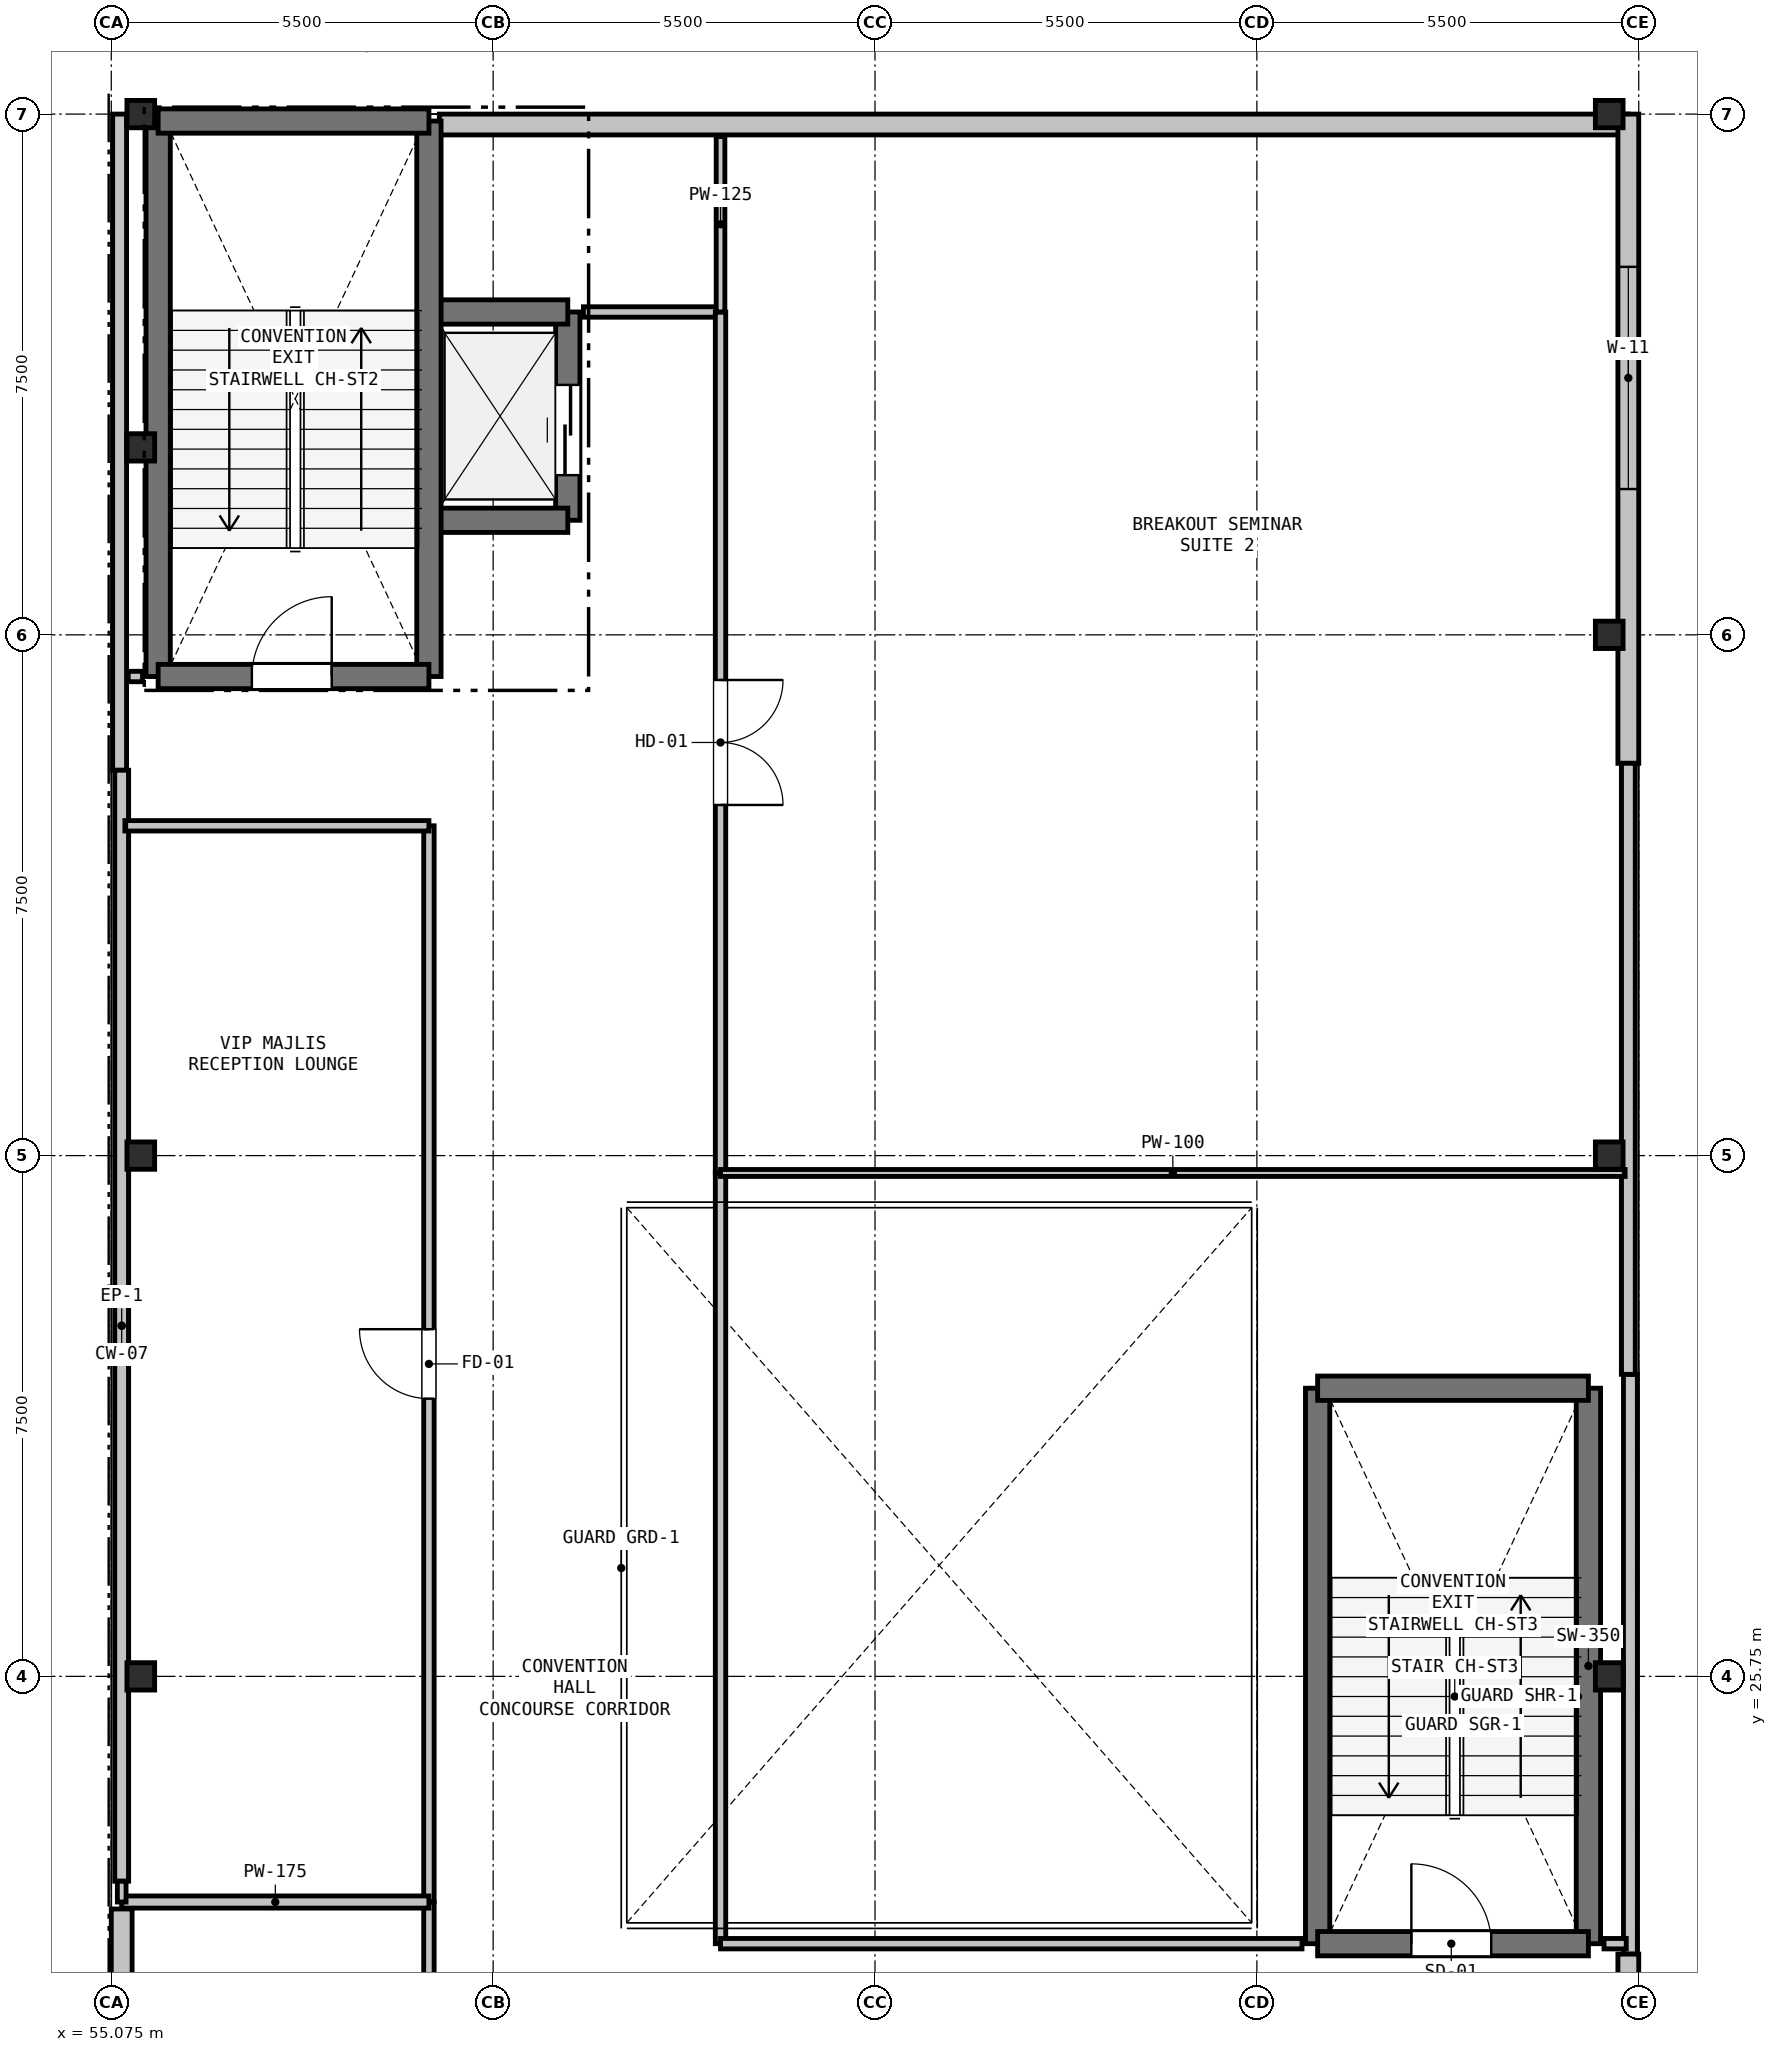
"""IFC4 building model, lengths in metres.
Left out: names, types, materials, properties, quantities, classifications, styles, units other than length and angle.
Written with IfcOpenShell. Run it as: python <this file> out.ifc"""

import sys

from ifc_helpers import new_model, si_unit, direction, frame, frame_2d, origin, origin_2d, place, context, subcontext, project, spatial, rectangle, i_section, extrude, element, fill, save


model = new_model("IFC4")
c1 = context("Model", 3, precision=1e-05, world=origin(), true_north=direction((0.0, 1.0)))
c2 = subcontext(c1, "Body", "Model", "MODEL_VIEW")
j1 = project(units=[si_unit("LENGTHUNIT", "METRE"), si_unit("PLANEANGLEUNIT", "RADIAN")], contexts=[c1])
p1 = place(None, origin())
s1 = spatial("IfcSite", under=j1, at=p1, CompositionType="ELEMENT")
p2 = place(p1, origin())
s2 = spatial("IfcBuilding", under=s1, at=p2, CompositionType="ELEMENT")
p3 = place(p2, frame((0.0, 0.0, 5.1)))
s3 = spatial("IfcBuildingStorey", under=s2, at=p3, CompositionType="ELEMENT", Elevation=5.1)
for number, where, z_axis, x_axis in (
    (1, (55.5, 25.75, 0.0), (0.0, 0.0, 1.0), (1.0, 0.0, 0.0)),
    (2, (55.5, 33.25, 0.0), (0.0, 0.0, 1.0), (1.0, 0.0, 0.0)),
    (3, (55.5, 43.45, 0.0), (0.0, 0.0, 1.0), (1.0, 0.0, 0.0)),
    (4, (55.5, 48.25, 0.0), (0.0, 0.0, 1.0), (1.0, 0.0, 0.0)),
    (5, (76.65, 25.75, 0.0), (0.0, 0.0, 1.0), (1.0, 0.0, 0.0)),
    (6, (76.65, 33.25, 0.0), (0.0, 0.0, 1.0), (1.0, 0.0, 0.0)),
    (7, (76.65, 40.75, 0.0), (0.0, 0.0, 1.0), (1.0, 0.0, 0.0)),
    (8, (76.65, 48.25, 0.0), (0.0, 0.0, 1.0), (1.0, 0.0, 0.0)),
):
    element("IfcColumn", number, at=place(p3, frame(where, z_axis=z_axis, x_axis=x_axis)), inside=s3, PredefinedType="COLUMN", context=c2, shape_type="SweptSolid", body=[
        extrude(i_section(OverallWidth=0.399, OverallDepth=0.394, WebThickness=0.023, FlangeThickness=0.037, at=origin_2d()), origin(), (0.0, 0.0, 1.0), 4.5),
    ])
p4 = place(p3, frame((55.195, 38.8, 0.0), z_axis=(0.0, 0.0, 1.0), x_axis=(0.0, 1.0, 0.0)))
e9 = element("IfcWall", 9, at=p4, inside=s3, PredefinedType="PARAPET", context=c2, shape_type="SweptSolid", body=[
    extrude(rectangle(XDim=9.45, YDim=0.2, at=frame_2d((4.725, 0.0))), origin(), (0.0, 0.0, 1.0), 3.79),
])
p5 = place(p3, frame((76.955, 30.1, 0.0), z_axis=(0.0, 0.0, 1.0), x_axis=(0.0, -1.0, 0.0)))
e10 = element("IfcWall", 10, at=p5, inside=s3, PredefinedType="PARAPET", context=c2, shape_type="SweptSolid", body=[
    extrude(rectangle(XDim=8.35, YDim=0.2, at=frame_2d((4.175, 0.0))), origin(), (0.0, 0.0, 1.0), 3.79),
])
p6 = place(p3, frame((55.225, 11.45, 0.0), z_axis=(0.0, 0.0, 1.0), x_axis=(0.0, 1.0, 0.0)))
e11 = element("IfcWall", 11, at=p6, inside=s3, PredefinedType="SOLIDWALL", context=c2, shape_type="SweptSolid", body=[
    extrude(rectangle(XDim=10.95, YDim=0.3, at=frame_2d((5.475, 0.0))), origin(), (0.0, 0.0, 1.0), 3.79),
])
p7 = place(p3, frame((59.8, 48.1, 0.0), z_axis=(0.0, 0.0, 1.0), x_axis=(1.0, 0.0, 0.0)))
e12 = element("IfcWall", 12, at=p7, inside=s3, PredefinedType="SOLIDWALL", context=c2, shape_type="SweptSolid", body=[
    extrude(rectangle(XDim=17.125, YDim=0.3, at=frame_2d((8.562, 0.0))), origin(), (0.0, 0.0, 1.0), 3.238),
])
p8 = place(p3, frame((76.925, 48.25, 0.0), z_axis=(0.0, 0.0, 1.0), x_axis=(0.0, -1.0, 0.0)))
e13 = element("IfcWall", 13, at=p8, inside=s3, PredefinedType="SOLIDWALL", context=c2, shape_type="SweptSolid", body=[
    extrude(rectangle(XDim=9.35, YDim=0.3, at=frame_2d((4.675, 0.0))), origin(), (0.0, 0.0, 1.0), 3.79),
])
p9 = place(p8, frame((2.2, 0.0, 0.9)))
e14 = element("IfcOpeningElement", 14, at=p9, cuts=e13, PredefinedType="OPENING", context=c2, shape_type="SweptSolid", body=[
    extrude(rectangle(XDim=3.2, YDim=2.4, at=frame_2d((1.6, 1.2))), frame((0.0, 0.16, 0.0), z_axis=(0.0, -1.0, 0.0), x_axis=(1.0, 0.0, 0.0)), (0.0, 0.0, 1.0), 0.32),
])
p10 = place(p3, frame((76.925, 21.75, 0.0), z_axis=(0.0, 0.0, 1.0), x_axis=(0.0, -1.0, 0.0)))
e15 = element("IfcWall", 15, at=p10, inside=s3, PredefinedType="SOLIDWALL", context=c2, shape_type="SweptSolid", body=[
    extrude(rectangle(XDim=18.5, YDim=0.3, at=frame_2d((9.25, 0.0))), origin(), (0.0, 0.0, 1.0), 3.79),
])
p11 = place(p3, frame((55.225, 22.8, 0.0), z_axis=(0.0, 0.0, 1.0), x_axis=(0.0, 1.0, 0.0)))
e16 = element("IfcWall", 16, at=p11, inside=s3, PredefinedType="PARAPET", context=c2, shape_type="SweptSolid", body=[
    extrude(rectangle(XDim=16.0, YDim=0.2, at=frame_2d((8.0, 0.0))), origin(), (0.0, 0.0, 1.0), 0.2),
])
p12 = place(p3, frame((76.925, 38.9, 0.0), z_axis=(0.0, 0.0, 1.0), x_axis=(0.0, -1.0, 0.0)))
e17 = element("IfcWall", 17, at=p12, inside=s3, PredefinedType="PARAPET", context=c2, shape_type="SweptSolid", body=[
    extrude(rectangle(XDim=8.8, YDim=0.2, at=frame_2d((4.4, 0.0))), origin(), (0.0, 0.0, 1.0), 0.2),
])
p13 = place(p3, frame((61.65, 42.4, 0.0), z_axis=(0.0, 0.0, 1.0), x_axis=(0.0, 1.0, 0.0)))
e18 = element("IfcWall", 18, at=p13, inside=s3, PredefinedType="SHEAR", context=c2, shape_type="SweptSolid", body=[
    extrude(rectangle(XDim=3.0, YDim=0.35, at=frame_2d((1.5, 0.0))), origin(), (0.0, 0.0, 1.0), 4.18),
])
p14 = place(p13, frame((0.65, 0.0, 0.0)))
e19 = element("IfcOpeningElement", 19, at=p14, cuts=e18, PredefinedType="OPENING", context=c2, shape_type="SweptSolid", body=[
    extrude(rectangle(XDim=1.3, YDim=2.2, at=frame_2d((0.65, 1.1))), frame((0.0, 0.185, 0.0), z_axis=(0.0, -1.0, 0.0), x_axis=(1.0, 0.0, 0.0)), (0.0, 0.0, 1.0), 0.37),
])
for number, where, z_axis, x_axis in (
    (20, (59.65, 45.4, 0.0), (0.0, 0.0, 1.0), (1.0, 0.0, 0.0)),
    (21, (59.65, 42.4, 0.0), (0.0, 0.0, 1.0), (1.0, 0.0, 0.0)),
):
    element("IfcWall", number, at=place(p3, frame(where, z_axis=z_axis, x_axis=x_axis)), inside=s3, PredefinedType="SHEAR", context=c2, shape_type="SweptSolid", body=[
        extrude(rectangle(XDim=2.0, YDim=0.35, at=frame_2d((1.0, 0.0))), origin(), (0.0, 0.0, 1.0), 4.18),
    ])
for number, where, z_axis, x_axis in (
    (22, (59.65, 48.15, 0.0), (0.0, 0.0, 1.0), (0.0, -1.0, 0.0)),
    (23, (55.75, 40.15, 0.0), (0.0, 0.0, 1.0), (0.0, 1.0, 0.0)),
):
    element("IfcWall", number, at=place(p3, frame(where, z_axis=z_axis, x_axis=x_axis)), inside=s3, PredefinedType="SHEAR", context=c2, shape_type="SweptSolid", body=[
        extrude(rectangle(XDim=8.0, YDim=0.35, at=frame_2d((4.0, 0.0))), origin(), (0.0, 0.0, 1.0), 4.18),
    ])
p15 = place(p3, frame((55.75, 48.15, 0.0), z_axis=(0.0, 0.0, 1.0), x_axis=(1.0, 0.0, 0.0)))
e24 = element("IfcWall", 24, at=p15, inside=s3, PredefinedType="SHEAR", context=c2, shape_type="SweptSolid", body=[
    extrude(rectangle(XDim=3.9, YDim=0.35, at=frame_2d((1.95, 0.0))), origin(), (0.0, 0.0, 1.0), 4.18),
])
p16 = place(p3, frame((55.75, 40.15, 0.0), z_axis=(0.0, 0.0, 1.0), x_axis=(1.0, 0.0, 0.0)))
e25 = element("IfcWall", 25, at=p16, inside=s3, PredefinedType="SHEAR", context=c2, shape_type="SweptSolid", body=[
    extrude(rectangle(XDim=3.9, YDim=0.35, at=frame_2d((1.95, 0.0))), origin(), (0.0, 0.0, 1.0), 4.18),
])
p17 = place(p16, frame((1.35, 0.0, 0.0)))
e26 = element("IfcOpeningElement", 26, at=p17, cuts=e25, PredefinedType="OPENING", context=c2, shape_type="SweptSolid", body=[
    extrude(rectangle(XDim=1.15, YDim=2.15, at=frame_2d((0.575, 1.075))), frame((0.0, 0.185, 0.0), z_axis=(0.0, -1.0, 0.0), x_axis=(1.0, 0.0, 0.0)), (0.0, 0.0, 1.0), 0.37),
])
for number, where, z_axis, x_axis in (
    (27, (76.35, 29.9, 0.0), (0.0, 0.0, 1.0), (0.0, -1.0, 0.0)),
    (28, (72.45, 21.9, 0.0), (0.0, 0.0, 1.0), (0.0, 1.0, 0.0)),
):
    element("IfcWall", number, at=place(p3, frame(where, z_axis=z_axis, x_axis=x_axis)), inside=s3, PredefinedType="SHEAR", context=c2, shape_type="SweptSolid", body=[
        extrude(rectangle(XDim=8.0, YDim=0.35, at=frame_2d((4.0, 0.0))), origin(), (0.0, 0.0, 1.0), 4.18),
    ])
p18 = place(p3, frame((72.45, 29.9, 0.0), z_axis=(0.0, 0.0, 1.0), x_axis=(1.0, 0.0, 0.0)))
e29 = element("IfcWall", 29, at=p18, inside=s3, PredefinedType="SHEAR", context=c2, shape_type="SweptSolid", body=[
    extrude(rectangle(XDim=3.9, YDim=0.35, at=frame_2d((1.95, 0.0))), origin(), (0.0, 0.0, 1.0), 4.18),
])
p19 = place(p3, frame((72.45, 21.9, 0.0), z_axis=(0.0, 0.0, 1.0), x_axis=(1.0, 0.0, 0.0)))
e30 = element("IfcWall", 30, at=p19, inside=s3, PredefinedType="SHEAR", context=c2, shape_type="SweptSolid", body=[
    extrude(rectangle(XDim=3.9, YDim=0.35, at=frame_2d((1.95, 0.0))), origin(), (0.0, 0.0, 1.0), 4.18),
])
p20 = place(p19, frame((1.35, 0.0, 0.0)))
e31 = element("IfcOpeningElement", 31, at=p20, cuts=e30, PredefinedType="OPENING", context=c2, shape_type="SweptSolid", body=[
    extrude(rectangle(XDim=1.15, YDim=2.15, at=frame_2d((0.575, 1.075))), frame((0.0, 0.185, 0.0), z_axis=(0.0, -1.0, 0.0), x_axis=(1.0, 0.0, 0.0)), (0.0, 0.0, 1.0), 0.37),
])
p21 = place(p3, frame((59.65, 19.5, 0.0), z_axis=(0.0, 0.0, 1.0), x_axis=(0.0, 1.0, 0.0)))
e32 = element("IfcWall", 32, at=p21, inside=s3, PredefinedType="PARTITIONING", context=c2, shape_type="SweptSolid", body=[
    extrude(rectangle(XDim=3.0, YDim=0.15, at=frame_2d((1.5, 0.0))), origin(), (0.0, 0.0, 1.0), 4.18),
])
p22 = place(p21, frame((1.075, 0.0, 0.0)))
e33 = element("IfcOpeningElement", 33, at=p22, cuts=e32, PredefinedType="OPENING", context=c2, shape_type="SweptSolid", body=[
    extrude(rectangle(XDim=0.85, YDim=2.1, at=frame_2d((0.425, 1.05))), frame((0.0, 0.085, 0.0), z_axis=(0.0, -1.0, 0.0), x_axis=(1.0, 0.0, 0.0)), (0.0, 0.0, 1.0), 0.17),
])
p23 = place(p3, frame((59.65, 22.5, 0.0), z_axis=(0.0, 0.0, 1.0), x_axis=(0.0, 1.0, 0.0)))
e34 = element("IfcWall", 34, at=p23, inside=s3, PredefinedType="PARTITIONING", context=c2, shape_type="SweptSolid", body=[
    extrude(rectangle(XDim=15.5, YDim=0.15, at=frame_2d((7.75, 0.0))), origin(), (0.0, 0.0, 1.0), 3.238),
])
p24 = place(p23, frame((7.25, 0.0, 0.0)))
e35 = element("IfcOpeningElement", 35, at=p24, cuts=e34, PredefinedType="OPENING", context=c2, shape_type="SweptSolid", body=[
    extrude(rectangle(XDim=1.0, YDim=2.15, at=frame_2d((0.5, 1.075))), frame((0.0, 0.085, 0.0), z_axis=(0.0, -1.0, 0.0), x_axis=(1.0, 0.0, 0.0)), (0.0, 0.0, 1.0), 0.17),
])
p25 = place(p3, frame((59.65, 38.0, 0.0), z_axis=(0.0, 0.0, 1.0), x_axis=(-1.0, 0.0, 0.0)))
e36 = element("IfcWall", 36, at=p25, inside=s3, PredefinedType="PARTITIONING", context=c2, shape_type="SweptSolid", body=[
    extrude(rectangle(XDim=4.379, YDim=0.15, at=frame_2d((2.189, 0.0))), origin(), (0.0, 0.0, 1.0), 3.79),
])
p26 = place(p3, frame((55.319, 40.15, 0.0), z_axis=(0.0, 0.0, 1.0), x_axis=(1.0, 0.0, 0.0)))
e37 = element("IfcWall", 37, at=p26, inside=s3, PredefinedType="PARTITIONING", context=c2, shape_type="SweptSolid", body=[
    extrude(rectangle(XDim=0.206, YDim=0.15, at=frame_2d((0.103, 0.0))), origin(), (0.0, 0.0, 1.0), 3.79),
])
p27 = place(p3, frame((61.875, 45.4, 0.0), z_axis=(0.0, 0.0, 1.0), x_axis=(1.0, 0.0, 0.0)))
e38 = element("IfcWall", 38, at=p27, inside=s3, PredefinedType="PARTITIONING", context=c2, shape_type="SweptSolid", body=[
    extrude(rectangle(XDim=1.975, YDim=0.15, at=frame_2d((0.988, 0.0))), origin(), (0.0, 0.0, 1.0), 3.858),
])
p28 = place(p3, frame((63.85, 45.4, 0.0), z_axis=(0.0, 0.0, 1.0), x_axis=(0.0, -1.0, 0.0)))
e39 = element("IfcWall", 39, at=p28, inside=s3, PredefinedType="PARTITIONING", context=c2, shape_type="SweptSolid", body=[
    extrude(rectangle(XDim=12.4, YDim=0.15, at=frame_2d((6.2, 0.0))), origin(), (0.0, 0.0, 1.0), 3.238),
])
p29 = place(p28, frame((5.3, 0.0, 0.0)))
e40 = element("IfcOpeningElement", 40, at=p29, cuts=e39, PredefinedType="OPENING", context=c2, shape_type="SweptSolid", body=[
    extrude(rectangle(XDim=1.8, YDim=2.2, at=frame_2d((0.9, 1.1))), frame((0.0, 0.085, 0.0), z_axis=(0.0, -1.0, 0.0), x_axis=(1.0, 0.0, 0.0)), (0.0, 0.0, 1.0), 0.17),
])
p30 = place(p3, frame((63.85, 33.0, 0.0), z_axis=(0.0, 0.0, 1.0), x_axis=(0.0, -1.0, 0.0)))
e41 = element("IfcWall", 41, at=p30, inside=s3, PredefinedType="PARTITIONING", context=c2, shape_type="SweptSolid", body=[
    extrude(rectangle(XDim=11.1, YDim=0.15, at=frame_2d((5.55, 0.0))), origin(), (0.0, 0.0, 1.0), 3.238),
])
p31 = place(p3, frame((63.85, 21.9, 0.0), z_axis=(0.0, 0.0, 1.0), x_axis=(1.0, 0.0, 0.0)))
e42 = element("IfcWall", 42, at=p31, inside=s3, PredefinedType="PARTITIONING", context=c2, shape_type="SweptSolid", body=[
    extrude(rectangle(XDim=8.375, YDim=0.15, at=frame_2d((4.188, 0.0))), origin(), (0.0, 0.0, 1.0), 3.858),
])
p32 = place(p3, frame((76.575, 21.9, 0.0), z_axis=(0.0, 0.0, 1.0), x_axis=(1.0, 0.0, 0.0)))
e43 = element("IfcWall", 43, at=p32, inside=s3, PredefinedType="PARTITIONING", context=c2, shape_type="SweptSolid", body=[
    extrude(rectangle(XDim=0.32, YDim=0.15, at=frame_2d((0.16, 0.0))), origin(), (0.0, 0.0, 1.0), 3.79),
])
p33 = place(p3, frame((55.225, 22.5, 0.0), z_axis=(0.0, 0.0, 1.0), x_axis=(1.0, 0.0, 0.0)))
e44 = element("IfcWall", 44, at=p33, inside=s3, PredefinedType="PLUMBINGWALL", context=c2, shape_type="SweptSolid", body=[
    extrude(rectangle(XDim=4.425, YDim=0.175, at=frame_2d((2.212, 0.0))), origin(), (0.0, 0.0, 1.0), 3.79),
])
p34 = place(p3, frame((55.225, 22.5, 0.0), z_axis=(0.0, 0.0, 1.0), x_axis=(0.0, 1.0, 0.0)))
e45 = element("IfcWall", 45, at=p34, inside=s3, PredefinedType="PARTITIONING", context=c2, shape_type="SweptSolid", body=[
    extrude(rectangle(XDim=0.3, YDim=0.125, at=frame_2d((0.15, 0.0))), origin(), (0.0, 0.0, 1.0), 3.79),
])
p35 = place(p3, frame((63.85, 45.4, 0.0), z_axis=(0.0, 0.0, 1.0), x_axis=(0.0, 1.0, 0.0)))
e46 = element("IfcWall", 46, at=p35, inside=s3, PredefinedType="PARTITIONING", context=c2, shape_type="SweptSolid", body=[
    extrude(rectangle(XDim=2.526, YDim=0.125, at=frame_2d((1.263, 0.0))), origin(), (0.0, 0.0, 1.0), 4.18),
])
p36 = place(p3, frame((76.879, 33.0, 0.0), z_axis=(0.0, 0.0, 1.0), x_axis=(-1.0, 0.0, 0.0)))
e47 = element("IfcWall", 47, at=p36, inside=s3, PredefinedType="PARTITIONING", context=c2, shape_type="SweptSolid", body=[
    extrude(rectangle(XDim=13.029, YDim=0.1, at=frame_2d((6.514, 0.0))), origin(), (0.0, 0.0, 1.0), 3.238),
])
p37 = place(p9, origin())
e48 = element("IfcWindow", 48, at=p37, inside=s3, PartitioningType="SINGLE_PANEL", PredefinedType="WINDOW", context=c2, shape_type="SweptSolid", body=[
    extrude(rectangle(XDim=3.2, YDim=2.4, at=frame_2d((1.6, 1.2))), frame((0.0, 0.03, 0.0), z_axis=(0.0, -1.0, 0.0), x_axis=(1.0, 0.0, 0.0)), (0.0, 0.0, 1.0), 0.06),
])
fill(e14, e48)
p38 = place(p14, origin())
e49 = element("IfcDoor", 49, at=p38, inside=s3, OperationType="SLIDING_TO_LEFT", PredefinedType="DOOR", context=c2, shape_type="SweptSolid", body=[
    extrude(rectangle(XDim=1.3, YDim=2.2, at=frame_2d((0.65, 1.1))), frame((0.0, 0.025, 0.0), z_axis=(0.0, -1.0, 0.0), x_axis=(1.0, 0.0, 0.0)), (0.0, 0.0, 1.0), 0.05),
])
fill(e19, e49)
p39 = place(p17, origin())
e50 = element("IfcDoor", 50, at=p39, inside=s3, OperationType="SINGLE_SWING_RIGHT", PredefinedType="DOOR", context=c2, shape_type="SweptSolid", body=[
    extrude(rectangle(XDim=1.15, YDim=2.15, at=frame_2d((0.575, 1.075))), frame((0.0, 0.025, 0.0), z_axis=(0.0, -1.0, 0.0), x_axis=(1.0, 0.0, 0.0)), (0.0, 0.0, 1.0), 0.05),
])
fill(e26, e50)
p40 = place(p20, origin())
e51 = element("IfcDoor", 51, at=p40, inside=s3, OperationType="SINGLE_SWING_LEFT", PredefinedType="DOOR", context=c2, shape_type="SweptSolid", body=[
    extrude(rectangle(XDim=1.15, YDim=2.15, at=frame_2d((0.575, 1.075))), frame((0.0, 0.025, 0.0), z_axis=(0.0, -1.0, 0.0), x_axis=(1.0, 0.0, 0.0)), (0.0, 0.0, 1.0), 0.05),
])
fill(e31, e51)
p41 = place(p24, origin())
e52 = element("IfcDoor", 52, at=p41, inside=s3, OperationType="SINGLE_SWING_RIGHT", PredefinedType="DOOR", context=c2, shape_type="SweptSolid", body=[
    extrude(rectangle(XDim=1.0, YDim=2.15, at=frame_2d((0.5, 1.075))), frame((0.0, 0.025, 0.0), z_axis=(0.0, -1.0, 0.0), x_axis=(1.0, 0.0, 0.0)), (0.0, 0.0, 1.0), 0.05),
])
fill(e35, e52)
p42 = place(p29, origin())
e53 = element("IfcDoor", 53, at=p42, inside=s3, OperationType="DOUBLE_DOOR_SINGLE_SWING", PredefinedType="DOOR", context=c2, shape_type="SweptSolid", body=[
    extrude(rectangle(XDim=1.8, YDim=2.2, at=frame_2d((0.9, 1.1))), frame((0.0, 0.025, 0.0), z_axis=(0.0, -1.0, 0.0), x_axis=(1.0, 0.0, 0.0)), (0.0, 0.0, 1.0), 0.05),
])
fill(e40, e53)
save(model, sys.argv[1])
